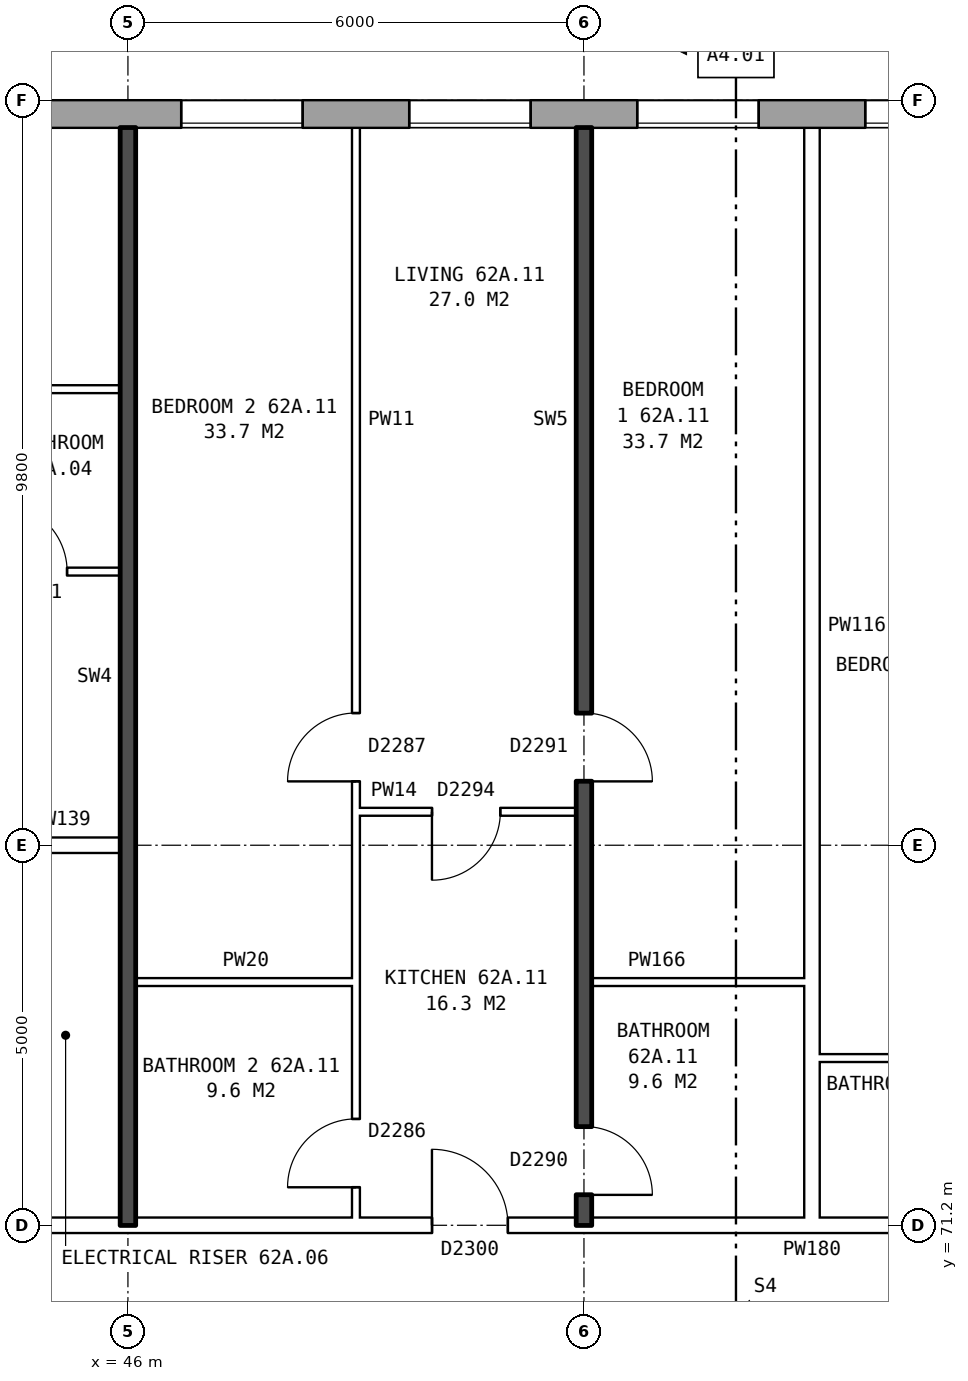
"""IFC4 building model, lengths in metres.
Left out: names, types, materials, properties, quantities, classifications, styles, units other than length and angle.
Written with IfcOpenShell. Run it as: python <this file> out.ifc"""

import sys

from ifc_helpers import new_model, si_unit, direction, frame, frame_2d, origin, place, context, subcontext, project, spatial, rectangle, extrude, element, fill, save


model = new_model("IFC4")
c1 = context("Model", 3, precision=1e-05, world=origin(), true_north=direction((0.0, 1.0)))
c2 = subcontext(c1, "Body", "Model", "MODEL_VIEW")
j1 = project(units=[si_unit("LENGTHUNIT", "METRE"), si_unit("PLANEANGLEUNIT", "RADIAN")], contexts=[c1])
p1 = place(None, origin())
s1 = spatial("IfcSite", under=j1, at=p1, CompositionType="ELEMENT")
p2 = place(p1, origin())
s2 = spatial("IfcBuilding", under=s1, at=p2, CompositionType="ELEMENT")
p3 = place(p2, frame((0.0, 0.0, 221.4)))
s3 = spatial("IfcBuildingStorey", under=s2, at=p3, CompositionType="ELEMENT", Elevation=221.4)
p4 = place(p3, frame((74.95, 85.82, 0.0), z_axis=(0.0, 0.0, 1.0), x_axis=(-1.0, 0.0, 0.0)))
e1 = element("IfcWall", 1, at=p4, inside=s3, PredefinedType="STANDARD", context=c2, shape_type="SweptSolid", body=[
    extrude(rectangle(XDim=39.875, YDim=0.36, at=frame_2d((19.938, 0.0))), origin(), (0.0, 0.0, 1.0), 2.85),
])
p5 = place(p4, frame((2.65, 0.0, 0.8)))
e2 = element("IfcOpeningElement", 2, at=p5, cuts=e1, PredefinedType="OPENING", context=c2, shape_type="SweptSolid", body=[
    extrude(rectangle(XDim=1.6, YDim=1.8, at=frame_2d((0.8, 0.9))), frame((0.0, 0.19, 0.0), z_axis=(0.0, -1.0, 0.0), x_axis=(1.0, 0.0, 0.0)), (0.0, 0.0, 1.0), 0.38),
])
p6 = place(p4, frame((5.65, 0.0, 0.8)))
e3 = element("IfcOpeningElement", 3, at=p6, cuts=e1, PredefinedType="OPENING", context=c2, shape_type="SweptSolid", body=[
    extrude(rectangle(XDim=1.6, YDim=1.8, at=frame_2d((0.8, 0.9))), frame((0.0, 0.19, 0.0), z_axis=(0.0, -1.0, 0.0), x_axis=(1.0, 0.0, 0.0)), (0.0, 0.0, 1.0), 0.38),
])
p7 = place(p4, frame((8.65, 0.0, 0.8)))
e4 = element("IfcOpeningElement", 4, at=p7, cuts=e1, PredefinedType="OPENING", context=c2, shape_type="SweptSolid", body=[
    extrude(rectangle(XDim=1.6, YDim=1.8, at=frame_2d((0.8, 0.9))), frame((0.0, 0.19, 0.0), z_axis=(0.0, -1.0, 0.0), x_axis=(1.0, 0.0, 0.0)), (0.0, 0.0, 1.0), 0.38),
])
p8 = place(p4, frame((11.15, 0.0, 1.55)))
e5 = element("IfcOpeningElement", 5, at=p8, cuts=e1, PredefinedType="OPENING", context=c2, shape_type="SweptSolid", body=[
    extrude(rectangle(XDim=0.6, YDim=0.9, at=frame_2d((0.3, 0.45))), frame((0.0, 0.19, 0.0), z_axis=(0.0, -1.0, 0.0), x_axis=(1.0, 0.0, 0.0)), (0.0, 0.0, 1.0), 0.38),
])
p9 = place(p4, frame((14.65, 0.0, 0.8)))
e6 = element("IfcOpeningElement", 6, at=p9, cuts=e1, PredefinedType="OPENING", context=c2, shape_type="SweptSolid", body=[
    extrude(rectangle(XDim=1.6, YDim=1.8, at=frame_2d((0.8, 0.9))), frame((0.0, 0.19, 0.0), z_axis=(0.0, -1.0, 0.0), x_axis=(1.0, 0.0, 0.0)), (0.0, 0.0, 1.0), 0.38),
])
p10 = place(p4, frame((17.65, 0.0, 0.8)))
e7 = element("IfcOpeningElement", 7, at=p10, cuts=e1, PredefinedType="OPENING", context=c2, shape_type="SweptSolid", body=[
    extrude(rectangle(XDim=1.6, YDim=1.8, at=frame_2d((0.8, 0.9))), frame((0.0, 0.19, 0.0), z_axis=(0.0, -1.0, 0.0), x_axis=(1.0, 0.0, 0.0)), (0.0, 0.0, 1.0), 0.38),
])
p11 = place(p4, frame((20.65, 0.0, 0.8)))
e8 = element("IfcOpeningElement", 8, at=p11, cuts=e1, PredefinedType="OPENING", context=c2, shape_type="SweptSolid", body=[
    extrude(rectangle(XDim=1.6, YDim=1.8, at=frame_2d((0.8, 0.9))), frame((0.0, 0.19, 0.0), z_axis=(0.0, -1.0, 0.0), x_axis=(1.0, 0.0, 0.0)), (0.0, 0.0, 1.0), 0.38),
])
p12 = place(p4, frame((23.65, 0.0, 0.8)))
e9 = element("IfcOpeningElement", 9, at=p12, cuts=e1, PredefinedType="OPENING", context=c2, shape_type="SweptSolid", body=[
    extrude(rectangle(XDim=1.6, YDim=1.8, at=frame_2d((0.8, 0.9))), frame((0.0, 0.19, 0.0), z_axis=(0.0, -1.0, 0.0), x_axis=(1.0, 0.0, 0.0)), (0.0, 0.0, 1.0), 0.38),
])
p13 = place(p4, frame((26.65, 0.0, 0.8)))
e10 = element("IfcOpeningElement", 10, at=p13, cuts=e1, PredefinedType="OPENING", context=c2, shape_type="SweptSolid", body=[
    extrude(rectangle(XDim=1.6, YDim=1.8, at=frame_2d((0.8, 0.9))), frame((0.0, 0.19, 0.0), z_axis=(0.0, -1.0, 0.0), x_axis=(1.0, 0.0, 0.0)), (0.0, 0.0, 1.0), 0.38),
])
p14 = place(p4, frame((30.05, 0.0, 1.7)))
e11 = element("IfcOpeningElement", 11, at=p14, cuts=e1, PredefinedType="OPENING", context=c2, shape_type="SweptSolid", body=[
    extrude(rectangle(XDim=0.6, YDim=0.9, at=frame_2d((0.3, 0.45))), frame((0.0, 0.19, 0.0), z_axis=(0.0, -1.0, 0.0), x_axis=(1.0, 0.0, 0.0)), (0.0, 0.0, 1.0), 0.38),
])
p15 = place(p4, frame((32.65, 0.0, 0.8)))
e12 = element("IfcOpeningElement", 12, at=p15, cuts=e1, PredefinedType="OPENING", context=c2, shape_type="SweptSolid", body=[
    extrude(rectangle(XDim=1.6, YDim=1.8, at=frame_2d((0.8, 0.9))), frame((0.0, 0.19, 0.0), z_axis=(0.0, -1.0, 0.0), x_axis=(1.0, 0.0, 0.0)), (0.0, 0.0, 1.0), 0.38),
])
p16 = place(p4, frame((35.65, 0.0, 0.8)))
e13 = element("IfcOpeningElement", 13, at=p16, cuts=e1, PredefinedType="OPENING", context=c2, shape_type="SweptSolid", body=[
    extrude(rectangle(XDim=1.6, YDim=1.8, at=frame_2d((0.8, 0.9))), frame((0.0, 0.19, 0.0), z_axis=(0.0, -1.0, 0.0), x_axis=(1.0, 0.0, 0.0)), (0.0, 0.0, 1.0), 0.38),
])
p17 = place(p4, frame((13.0, 0.0, 0.15)))
e14 = element("IfcOpeningElement", 14, at=p17, cuts=e1, PredefinedType="OPENING", context=c2, shape_type="SweptSolid", body=[
    extrude(rectangle(XDim=0.8, YDim=1.5, at=frame_2d((0.4, 0.75))), frame((0.0, 0.19, 0.0), z_axis=(0.0, -1.0, 0.0), x_axis=(1.0, 0.0, 0.0)), (0.0, 0.0, 1.0), 0.38),
])
p18 = place(p4, frame((30.95, 0.0, 0.8)))
e15 = element("IfcOpeningElement", 15, at=p18, cuts=e1, PredefinedType="OPENING", context=c2, shape_type="SweptSolid", body=[
    extrude(rectangle(XDim=1.4, YDim=1.8, at=frame_2d((0.7, 0.9))), frame((0.0, 0.19, 0.0), z_axis=(0.0, -1.0, 0.0), x_axis=(1.0, 0.0, 0.0)), (0.0, 0.0, 1.0), 0.38),
])
p19 = place(p3, frame((44.36, 71.2, 0.0), z_axis=(0.0, 0.0, 1.0), x_axis=(1.0, 0.0, 0.0)))
e16 = element("IfcWall", 16, at=p19, inside=s3, PredefinedType="PARTITIONING", context=c2, shape_type="SweptSolid", body=[
    extrude(rectangle(XDim=19.28, YDim=0.2, at=frame_2d((9.64, 0.0))), origin(), (0.0, 0.0, 1.0), 2.85),
])
p20 = place(p19, frame((14.64, 0.0, 0.0)))
e17 = element("IfcOpeningElement", 17, at=p20, cuts=e16, PredefinedType="OPENING", context=c2, shape_type="SweptSolid", body=[
    extrude(rectangle(XDim=1.0, YDim=2.1, at=frame_2d((0.5, 1.05))), frame((0.0, 0.11, 0.0), z_axis=(0.0, -1.0, 0.0), x_axis=(1.0, 0.0, 0.0)), (0.0, 0.0, 1.0), 0.22),
])
p21 = place(p19, frame((5.64, 0.0, 0.0)))
e18 = element("IfcOpeningElement", 18, at=p21, cuts=e16, PredefinedType="OPENING", context=c2, shape_type="SweptSolid", body=[
    extrude(rectangle(XDim=1.0, YDim=2.1, at=frame_2d((0.5, 1.05))), frame((0.0, 0.11, 0.0), z_axis=(0.0, -1.0, 0.0), x_axis=(1.0, 0.0, 0.0)), (0.0, 0.0, 1.0), 0.22),
])
p22 = place(p3, frame((55.1, 73.4, 0.0), z_axis=(0.0, 0.0, 1.0), x_axis=(1.0, 0.0, 0.0)))
e19 = element("IfcWall", 19, at=p22, inside=s3, PredefinedType="PARTITIONING", context=c2, shape_type="SweptSolid", body=[
    extrude(rectangle(XDim=2.8, YDim=0.1, at=frame_2d((1.4, 0.0))), origin(), (0.0, 0.0, 1.0), 2.85),
])
p23 = place(p3, frame((46.1, 74.4, 0.0), z_axis=(0.0, 0.0, 1.0), x_axis=(1.0, 0.0, 0.0)))
e20 = element("IfcWall", 20, at=p23, inside=s3, PredefinedType="PARTITIONING", context=c2, shape_type="SweptSolid", body=[
    extrude(rectangle(XDim=2.9, YDim=0.1, at=frame_2d((1.45, 0.0))), origin(), (0.0, 0.0, 1.0), 2.85),
])
p24 = place(p3, frame((52.1, 74.4, 0.0), z_axis=(0.0, 0.0, 1.0), x_axis=(1.0, 0.0, 0.0)))
e21 = element("IfcWall", 21, at=p24, inside=s3, PredefinedType="PARTITIONING", context=c2, shape_type="SweptSolid", body=[
    extrude(rectangle(XDim=2.8, YDim=0.1, at=frame_2d((1.4, 0.0))), origin(), (0.0, 0.0, 1.0), 2.85),
])
p25 = place(p3, frame((44.36, 76.2, 0.0), z_axis=(0.0, 0.0, 1.0), x_axis=(1.0, 0.0, 0.0)))
e22 = element("IfcWall", 22, at=p25, inside=s3, PredefinedType="PARTITIONING", context=c2, shape_type="SweptSolid", body=[
    extrude(rectangle(XDim=1.54, YDim=0.2, at=frame_2d((0.77, 0.0))), origin(), (0.0, 0.0, 1.0), 2.85),
])
p26 = place(p3, frame((49.0, 76.64, 0.0), z_axis=(0.0, 0.0, 1.0), x_axis=(1.0, 0.0, 0.0)))
e23 = element("IfcWall", 23, at=p26, inside=s3, PredefinedType="PARTITIONING", context=c2, shape_type="SweptSolid", body=[
    extrude(rectangle(XDim=2.9, YDim=0.1, at=frame_2d((1.45, 0.0))), origin(), (0.0, 0.0, 1.0), 2.85),
])
p27 = place(p26, frame((1.0, 0.0, 0.0)))
e24 = element("IfcOpeningElement", 24, at=p27, cuts=e23, PredefinedType="OPENING", context=c2, shape_type="SweptSolid", body=[
    extrude(rectangle(XDim=0.9, YDim=2.1, at=frame_2d((0.45, 1.05))), frame((0.0, 0.06, 0.0), z_axis=(0.0, -1.0, 0.0), x_axis=(1.0, 0.0, 0.0)), (0.0, 0.0, 1.0), 0.12),
])
p28 = place(p3, frame((40.1, 79.8, 0.0), z_axis=(0.0, 0.0, 1.0), x_axis=(1.0, 0.0, 0.0)))
e25 = element("IfcWall", 25, at=p28, inside=s3, PredefinedType="PARTITIONING", context=c2, shape_type="SweptSolid", body=[
    extrude(rectangle(XDim=5.8, YDim=0.1, at=frame_2d((2.9, 0.0))), origin(), (0.0, 0.0, 1.0), 2.85),
])
p29 = place(p28, frame((1.3, 0.0, 0.0)))
e26 = element("IfcOpeningElement", 26, at=p29, cuts=e25, PredefinedType="OPENING", context=c2, shape_type="SweptSolid", body=[
    extrude(rectangle(XDim=0.9, YDim=2.1, at=frame_2d((0.45, 1.05))), frame((0.0, 0.06, 0.0), z_axis=(0.0, -1.0, 0.0), x_axis=(1.0, 0.0, 0.0)), (0.0, 0.0, 1.0), 0.12),
])
p30 = place(p28, frame((4.2, 0.0, 0.0)))
e27 = element("IfcOpeningElement", 27, at=p30, cuts=e25, PredefinedType="OPENING", context=c2, shape_type="SweptSolid", body=[
    extrude(rectangle(XDim=0.9, YDim=2.1, at=frame_2d((0.45, 1.05))), frame((0.0, 0.06, 0.0), z_axis=(0.0, -1.0, 0.0), x_axis=(1.0, 0.0, 0.0)), (0.0, 0.0, 1.0), 0.12),
])
p31 = place(p3, frame((43.6, 82.2, 0.0), z_axis=(0.0, 0.0, 1.0), x_axis=(1.0, 0.0, 0.0)))
e28 = element("IfcWall", 28, at=p31, inside=s3, PredefinedType="PARTITIONING", context=c2, shape_type="SweptSolid", body=[
    extrude(rectangle(XDim=2.3, YDim=0.1, at=frame_2d((1.15, 0.0))), origin(), (0.0, 0.0, 1.0), 2.85),
])
p32 = place(p3, frame((46.0, 71.2, 0.0), z_axis=(0.0, 0.0, 1.0), x_axis=(0.0, 1.0, 0.0)))
e29 = element("IfcWall", 29, at=p32, inside=s3, PredefinedType="SOLIDWALL", context=c2, shape_type="SweptSolid", body=[
    extrude(rectangle(XDim=14.44, YDim=0.2, at=frame_2d((7.22, 0.0))), origin(), (0.0, 0.0, 1.0), 2.85),
])
p33 = place(p3, frame((49.0, 71.3, 0.0), z_axis=(0.0, 0.0, 1.0), x_axis=(0.0, 1.0, 0.0)))
e30 = element("IfcWall", 30, at=p33, inside=s3, PredefinedType="PARTITIONING", context=c2, shape_type="SweptSolid", body=[
    extrude(rectangle(XDim=14.34, YDim=0.1, at=frame_2d((7.17, 0.0))), origin(), (0.0, 0.0, 1.0), 2.85),
])
p34 = place(p33, frame((5.74, 0.0, 0.0)))
e31 = element("IfcOpeningElement", 31, at=p34, cuts=e30, PredefinedType="OPENING", context=c2, shape_type="SweptSolid", body=[
    extrude(rectangle(XDim=0.9, YDim=2.1, at=frame_2d((0.45, 1.05))), frame((0.0, 0.06, 0.0), z_axis=(0.0, -1.0, 0.0), x_axis=(1.0, 0.0, 0.0)), (0.0, 0.0, 1.0), 0.12),
])
p35 = place(p33, frame((0.4, 0.0, 0.0)))
e32 = element("IfcOpeningElement", 32, at=p35, cuts=e30, PredefinedType="OPENING", context=c2, shape_type="SweptSolid", body=[
    extrude(rectangle(XDim=0.9, YDim=2.1, at=frame_2d((0.45, 1.05))), frame((0.0, 0.06, 0.0), z_axis=(0.0, -1.0, 0.0), x_axis=(1.0, 0.0, 0.0)), (0.0, 0.0, 1.0), 0.12),
])
p36 = place(p3, frame((52.0, 71.2, 0.0), z_axis=(0.0, 0.0, 1.0), x_axis=(0.0, 1.0, 0.0)))
e33 = element("IfcWall", 33, at=p36, inside=s3, PredefinedType="SOLIDWALL", context=c2, shape_type="SweptSolid", body=[
    extrude(rectangle(XDim=14.44, YDim=0.2, at=frame_2d((7.22, 0.0))), origin(), (0.0, 0.0, 1.0), 2.85),
])
p37 = place(p36, frame((5.84, 0.0, 0.0)))
e34 = element("IfcOpeningElement", 34, at=p37, cuts=e33, PredefinedType="OPENING", context=c2, shape_type="SweptSolid", body=[
    extrude(rectangle(XDim=0.9, YDim=2.1, at=frame_2d((0.45, 1.05))), frame((0.0, 0.11, 0.0), z_axis=(0.0, -1.0, 0.0), x_axis=(1.0, 0.0, 0.0)), (0.0, 0.0, 1.0), 0.22),
])
p38 = place(p36, frame((0.4, 0.0, 0.0)))
e35 = element("IfcOpeningElement", 35, at=p38, cuts=e33, PredefinedType="OPENING", context=c2, shape_type="SweptSolid", body=[
    extrude(rectangle(XDim=0.9, YDim=2.1, at=frame_2d((0.45, 1.05))), frame((0.0, 0.11, 0.0), z_axis=(0.0, -1.0, 0.0), x_axis=(1.0, 0.0, 0.0)), (0.0, 0.0, 1.0), 0.22),
])
p39 = place(p3, frame((55.0, 71.3, 0.0), z_axis=(0.0, 0.0, 1.0), x_axis=(0.0, 1.0, 0.0)))
e36 = element("IfcWall", 36, at=p39, inside=s3, PredefinedType="PARTITIONING", context=c2, shape_type="SweptSolid", body=[
    extrude(rectangle(XDim=14.34, YDim=0.2, at=frame_2d((7.17, 0.0))), origin(), (0.0, 0.0, 1.0), 2.85),
])
p40 = place(p10, origin())
e37 = element("IfcWindow", 37, at=p40, inside=s3, PartitioningType="SINGLE_PANEL", PredefinedType="WINDOW", context=c2, shape_type="SweptSolid", body=[
    extrude(rectangle(XDim=1.6, YDim=1.8, at=frame_2d((0.8, 0.9))), frame((0.0, 0.15, 0.0), z_axis=(0.0, -1.0, 0.0), x_axis=(1.0, 0.0, 0.0)), (0.0, 0.0, 1.0), 0.06),
])
fill(e7, e37)
p41 = place(p11, origin())
e38 = element("IfcWindow", 38, at=p41, inside=s3, PartitioningType="SINGLE_PANEL", PredefinedType="WINDOW", context=c2, shape_type="SweptSolid", body=[
    extrude(rectangle(XDim=1.6, YDim=1.8, at=frame_2d((0.8, 0.9))), frame((0.0, 0.15, 0.0), z_axis=(0.0, -1.0, 0.0), x_axis=(1.0, 0.0, 0.0)), (0.0, 0.0, 1.0), 0.06),
])
fill(e8, e38)
p42 = place(p12, origin())
e39 = element("IfcWindow", 39, at=p42, inside=s3, PartitioningType="SINGLE_PANEL", PredefinedType="WINDOW", context=c2, shape_type="SweptSolid", body=[
    extrude(rectangle(XDim=1.6, YDim=1.8, at=frame_2d((0.8, 0.9))), frame((0.0, 0.15, 0.0), z_axis=(0.0, -1.0, 0.0), x_axis=(1.0, 0.0, 0.0)), (0.0, 0.0, 1.0), 0.06),
])
fill(e9, e39)
p43 = place(p13, origin())
e40 = element("IfcWindow", 40, at=p43, inside=s3, PartitioningType="SINGLE_PANEL", PredefinedType="WINDOW", context=c2, shape_type="SweptSolid", body=[
    extrude(rectangle(XDim=1.6, YDim=1.8, at=frame_2d((0.8, 0.9))), frame((0.0, 0.15, 0.0), z_axis=(0.0, -1.0, 0.0), x_axis=(1.0, 0.0, 0.0)), (0.0, 0.0, 1.0), 0.06),
])
fill(e10, e40)
p44 = place(p30, origin())
e41 = element("IfcDoor", 41, at=p44, inside=s3, OperationType="SINGLE_SWING_LEFT", PredefinedType="DOOR", context=c2, shape_type="SweptSolid", body=[
    extrude(rectangle(XDim=0.9, YDim=2.1, at=frame_2d((0.45, 1.05))), frame((0.0, 0.025, 0.0), z_axis=(0.0, -1.0, 0.0), x_axis=(1.0, 0.0, 0.0)), (0.0, 0.0, 1.0), 0.05),
])
fill(e27, e41)
p45 = place(p37, frame((0.9, 0.0, 0.0), z_axis=(0.0, 0.0, 1.0), x_axis=(-1.0, 0.0, 0.0)))
e42 = element("IfcDoor", 42, at=p45, inside=s3, OperationType="SINGLE_SWING_RIGHT", PredefinedType="DOOR", context=c2, shape_type="SweptSolid", body=[
    extrude(rectangle(XDim=0.9, YDim=2.1, at=frame_2d((0.45, 1.05))), frame((0.0, 0.025, 0.0), z_axis=(0.0, -1.0, 0.0), x_axis=(1.0, 0.0, 0.0)), (0.0, 0.0, 1.0), 0.05),
])
fill(e34, e42)
p46 = place(p34, origin())
e43 = element("IfcDoor", 43, at=p46, inside=s3, OperationType="SINGLE_SWING_LEFT", PredefinedType="DOOR", context=c2, shape_type="SweptSolid", body=[
    extrude(rectangle(XDim=0.9, YDim=2.1, at=frame_2d((0.45, 1.05))), frame((0.0, 0.025, 0.0), z_axis=(0.0, -1.0, 0.0), x_axis=(1.0, 0.0, 0.0)), (0.0, 0.0, 1.0), 0.05),
])
fill(e31, e43)
p47 = place(p21, origin())
e44 = element("IfcDoor", 44, at=p47, inside=s3, OperationType="SINGLE_SWING_LEFT", PredefinedType="DOOR", context=c2, shape_type="SweptSolid", body=[
    extrude(rectangle(XDim=1.0, YDim=2.1, at=frame_2d((0.5, 1.05))), frame((0.0, 0.025, 0.0), z_axis=(0.0, -1.0, 0.0), x_axis=(1.0, 0.0, 0.0)), (0.0, 0.0, 1.0), 0.05),
])
fill(e18, e44)
p48 = place(p27, frame((0.9, 0.0, 0.0), z_axis=(0.0, 0.0, 1.0), x_axis=(-1.0, 0.0, 0.0)))
e45 = element("IfcDoor", 45, at=p48, inside=s3, OperationType="SINGLE_SWING_RIGHT", PredefinedType="DOOR", context=c2, shape_type="SweptSolid", body=[
    extrude(rectangle(XDim=0.9, YDim=2.1, at=frame_2d((0.45, 1.05))), frame((0.0, 0.025, 0.0), z_axis=(0.0, -1.0, 0.0), x_axis=(1.0, 0.0, 0.0)), (0.0, 0.0, 1.0), 0.05),
])
fill(e24, e45)
p49 = place(p38, frame((0.9, 0.0, 0.0), z_axis=(0.0, 0.0, 1.0), x_axis=(-1.0, 0.0, 0.0)))
e46 = element("IfcDoor", 46, at=p49, inside=s3, OperationType="SINGLE_SWING_RIGHT", PredefinedType="DOOR", context=c2, shape_type="SweptSolid", body=[
    extrude(rectangle(XDim=0.9, YDim=2.1, at=frame_2d((0.45, 1.05))), frame((0.0, 0.025, 0.0), z_axis=(0.0, -1.0, 0.0), x_axis=(1.0, 0.0, 0.0)), (0.0, 0.0, 1.0), 0.05),
])
fill(e35, e46)
p50 = place(p35, origin())
e47 = element("IfcDoor", 47, at=p50, inside=s3, OperationType="SINGLE_SWING_LEFT", PredefinedType="DOOR", context=c2, shape_type="SweptSolid", body=[
    extrude(rectangle(XDim=0.9, YDim=2.1, at=frame_2d((0.45, 1.05))), frame((0.0, 0.025, 0.0), z_axis=(0.0, -1.0, 0.0), x_axis=(1.0, 0.0, 0.0)), (0.0, 0.0, 1.0), 0.05),
])
fill(e32, e47)
save(model, sys.argv[1])
